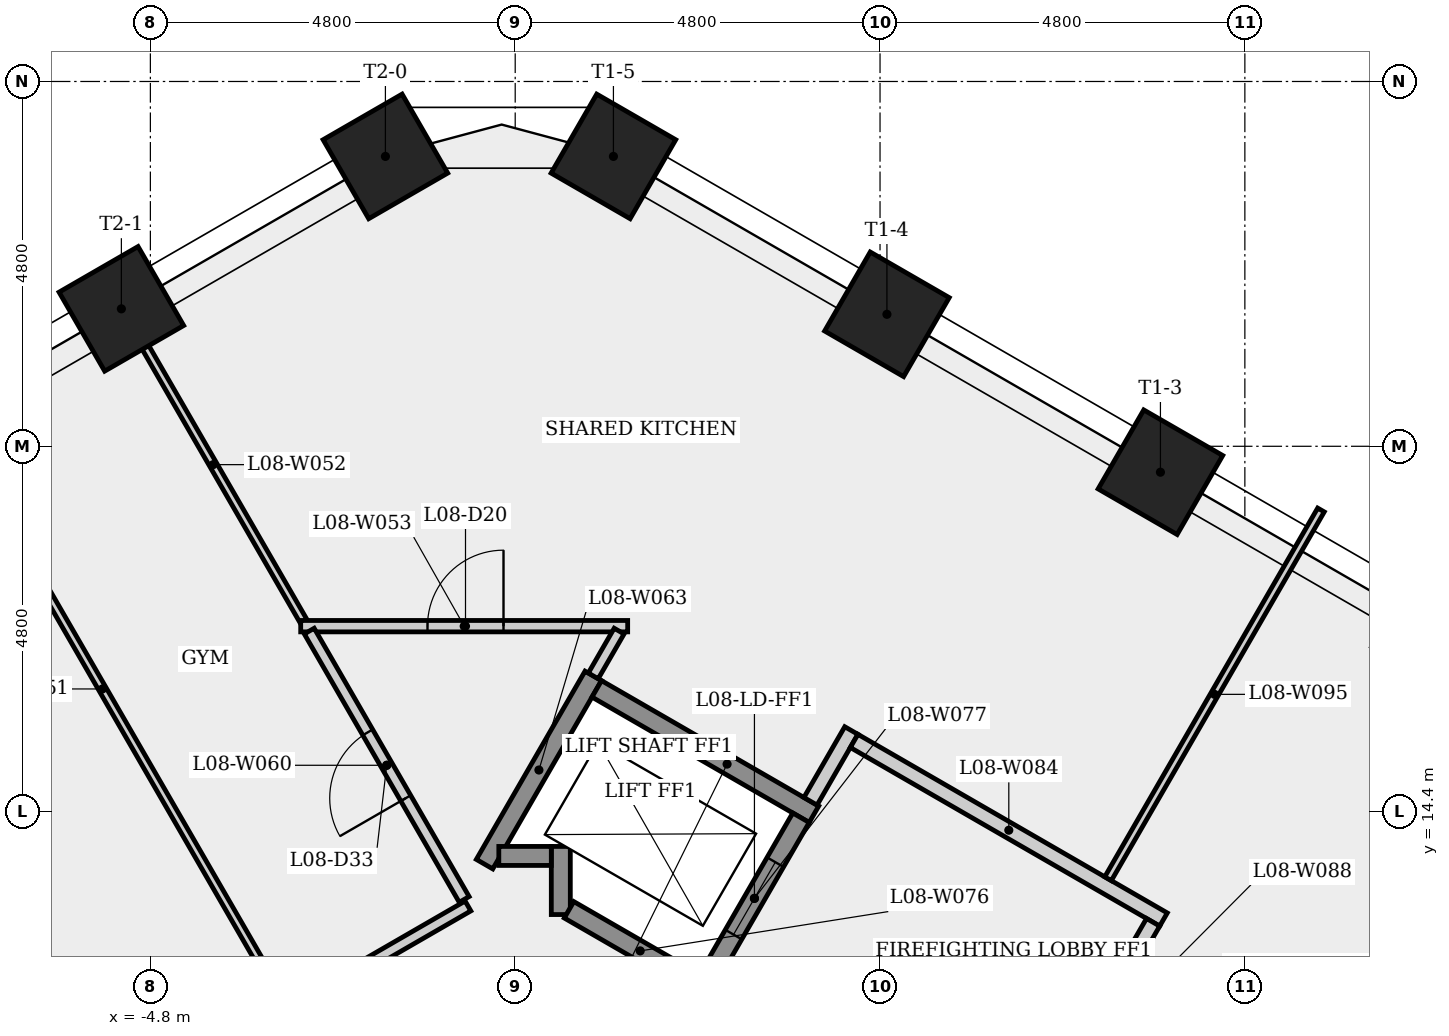
"""IFC4 building model, lengths in metres.
Left out: names, types, materials, properties, quantities, classifications, styles, units other than length and angle.
Written with IfcOpenShell. Run it as: python <this file> out.ifc"""

import sys

from ifc_helpers import new_model, si_unit, direction, frame, frame_2d, origin, origin_2d, place, context, subcontext, project, spatial, rectangle, extrude, element, fill, save


model = new_model("IFC4")
c1 = context("Model", 3, precision=1e-05, world=origin(), true_north=direction((0.0, 1.0)))
c2 = subcontext(c1, "Body", "Model", "MODEL_VIEW")
j1 = project(units=[si_unit("LENGTHUNIT", "METRE"), si_unit("PLANEANGLEUNIT", "RADIAN")], contexts=[c1])
p1 = place(None, origin())
s1 = spatial("IfcSite", under=j1, at=p1, CompositionType="ELEMENT")
p2 = place(p1, origin())
s2 = spatial("IfcBuilding", under=s1, at=p2, CompositionType="ELEMENT")
p3 = place(p2, frame((0.0, 0.0, 35.7)))
s3 = spatial("IfcBuildingStorey", under=s2, at=p3, CompositionType="ELEMENT", Elevation=35.7)
for number, where, z_axis, x_axis in (
    (1, (8.489, 18.859, 0.0), (0.0, 0.0, 1.0), (0.5, 0.866, 0.0)),
    (2, (4.891, 20.937, 0.0), (0.0, 0.0, 1.0), (0.5, 0.866, 0.0)),
    (3, (1.292, 23.014, 0.0), (0.0, 0.0, 1.0), (0.5, 0.866, 0.0)),
    (4, (-1.708, 23.014, 0.0), (0.0, 0.0, 1.0), (-0.5, 0.866, 0.0)),
    (5, (-5.182, 21.009, 0.0), (0.0, 0.0, 1.0), (-0.5, 0.866, 0.0)),
):
    element("IfcColumn", number, at=place(p3, frame(where, z_axis=z_axis, x_axis=x_axis)), inside=s3, PredefinedType="COLUMN", context=c2, shape_type="SweptSolid", body=[
        extrude(rectangle(XDim=1.2, YDim=1.2, at=origin_2d()), origin(), (0.0, 0.0, 1.0), 3.4),
    ])
p4 = place(p3, frame((-10.826, 7.26, 0.0), z_axis=(0.0, 0.0, 1.0), x_axis=(0.866022388473, 0.500005222637, 0.0)))
e6 = element("IfcWall", 6, at=p4, inside=s3, PredefinedType="PARTITIONING", context=c2, shape_type="SweptSolid", body=[
    extrude(rectangle(XDim=11.783, YDim=0.15, at=frame_2d((5.892, 0.0))), origin(), (0.0, 0.0, 1.0), 3.05),
])
p5 = place(p4, frame((5.89, 0.0, 0.0)))
e7 = element("IfcOpeningElement", 7, at=p5, cuts=e6, PredefinedType="OPENING", context=c2, shape_type="SweptSolid", body=[
    extrude(rectangle(XDim=1.0, YDim=2.1, at=frame_2d((0.5, 1.05))), frame((0.0, 0.085, 0.0), z_axis=(0.0, -1.0, 0.0), x_axis=(1.0, 0.0, 0.0)), (0.0, 0.0, 1.0), 0.17),
])
p6 = place(p3, frame((-3.029, 11.848, 0.0), z_axis=(0.0, 0.0, 1.0), x_axis=(-0.49998793222, 0.866032371008, 0.0)))
e8 = element("IfcWall", 8, at=p6, inside=s3, PredefinedType="PARTITIONING", context=c2, shape_type="SweptSolid", body=[
    extrude(rectangle(XDim=9.606, YDim=0.1, at=frame_2d((4.803, 0.0))), origin(), (0.0, 0.0, 1.0), 3.05),
])
p7 = place(p3, frame((-2.785, 16.898, 0.0), z_axis=(0.0, 0.0, 1.0), x_axis=(-0.500018554574, 0.866014691031, 0.0)))
e9 = element("IfcWall", 9, at=p7, inside=s3, PredefinedType="PARTITIONING", context=c2, shape_type="SweptSolid", body=[
    extrude(rectangle(XDim=4.758, YDim=0.1, at=frame_2d((2.379, 0.0))), origin(), (0.0, 0.0, 1.0), 3.05),
])
p8 = place(p3, frame((-2.822, 16.833, 0.0), z_axis=(0.0, 0.0, 1.0), x_axis=(1.0, 0.0, 0.0)))
e10 = element("IfcWall", 10, at=p8, inside=s3, PredefinedType="PARTITIONING", context=c2, shape_type="SweptSolid", body=[
    extrude(rectangle(XDim=4.302, YDim=0.15, at=frame_2d((2.151, 0.0))), origin(), (0.0, 0.0, 1.0), 3.05),
])
p9 = place(p8, frame((1.668, 0.0, 0.0)))
e11 = element("IfcOpeningElement", 11, at=p9, cuts=e10, PredefinedType="OPENING", context=c2, shape_type="SweptSolid", body=[
    extrude(rectangle(XDim=1.0, YDim=2.1, at=frame_2d((0.5, 1.05))), frame((0.0, 0.085, 0.0), z_axis=(0.0, -1.0, 0.0), x_axis=(1.0, 0.0, 0.0)), (0.0, 0.0, 1.0), 0.17),
])
p10 = place(p3, frame((-0.671, 13.237, 0.0), z_axis=(0.0, 0.0, 1.0), x_axis=(-0.499990257196, 0.866031028722, 0.0)))
e12 = element("IfcWall", 12, at=p10, inside=s3, PredefinedType="PARTITIONING", context=c2, shape_type="SweptSolid", body=[
    extrude(rectangle(XDim=4.077, YDim=0.15, at=frame_2d((2.039, 0.0))), origin(), (0.0, 0.0, 1.0), 3.05),
])
p11 = place(p10, frame((1.539, 0.0, 0.0)))
e13 = element("IfcOpeningElement", 13, at=p11, cuts=e12, PredefinedType="OPENING", context=c2, shape_type="SweptSolid", body=[
    extrude(rectangle(XDim=1.0, YDim=2.1, at=frame_2d((0.5, 1.05))), frame((0.0, 0.085, 0.0), z_axis=(0.0, -1.0, 0.0), x_axis=(1.0, 0.0, 0.0)), (0.0, 0.0, 1.0), 0.17),
])
p12 = place(p3, frame((-0.403, 13.702, 0.0), z_axis=(0.0, 0.0, 1.0), x_axis=(0.499976111731, 0.866039195244, 0.0)))
e14 = element("IfcWall", 14, at=p12, inside=s3, PredefinedType="SHEAR", context=c2, shape_type="SweptSolid", body=[
    extrude(rectangle(XDim=2.861, YDim=0.25, at=frame_2d((1.43, 0.0))), origin(), (0.0, 0.0, 1.0), 3.05),
])
p13 = place(p3, frame((0.6, 13.039, 0.0), z_axis=(0.0, 0.0, 1.0), x_axis=(0.0, 1.0, 0.0)))
e15 = element("IfcWall", 15, at=p13, inside=s3, PredefinedType="SHEAR", context=c2, shape_type="SweptSolid", body=[
    extrude(rectangle(XDim=0.896, YDim=0.25, at=frame_2d((0.448, 0.0))), origin(), (0.0, 0.0, 1.0), 3.05),
])
p14 = place(p3, frame((0.475, 13.81, 0.0), z_axis=(0.0, 0.0, 1.0), x_axis=(-1.0, 0.0, 0.0)))
e16 = element("IfcWall", 16, at=p14, inside=s3, PredefinedType="SHEAR", context=c2, shape_type="SweptSolid", body=[
    extrude(rectangle(XDim=0.691, YDim=0.25, at=frame_2d((0.345, 0.0))), origin(), (0.0, 0.0, 1.0), 3.4),
])
p15 = place(p3, frame((1.073, 16.008, 0.0), z_axis=(0.0, 0.0, 1.0), x_axis=(0.866040211805, -0.499974350878, 0.0)))
e17 = element("IfcWall", 17, at=p15, inside=s3, PredefinedType="SHEAR", context=c2, shape_type="SweptSolid", body=[
    extrude(rectangle(XDim=3.3, YDim=0.25, at=frame_2d((1.65, 0.0))), origin(), (0.0, 0.0, 1.0), 3.05),
])
p16 = place(p3, frame((1.367, 16.768, 0.0), z_axis=(0.0, 0.0, 1.0), x_axis=(-0.499805281321, -0.866137795483, 0.0)))
e18 = element("IfcWall", 18, at=p16, inside=s3, PredefinedType="PARTITIONING", context=c2, shape_type="SweptSolid", body=[
    extrude(rectangle(XDim=0.68, YDim=0.15, at=frame_2d((0.34, 0.0))), origin(), (0.0, 0.0, 1.0), 3.05),
])
p17 = place(p3, frame((2.581, 12.02, 0.0), z_axis=(0.0, 0.0, 1.0), x_axis=(-0.86603892542, 0.499976579108, 0.0)))
e19 = element("IfcWall", 19, at=p17, inside=s3, PredefinedType="SHEAR", context=c2, shape_type="SweptSolid", body=[
    extrude(rectangle(XDim=2.162, YDim=0.25, at=frame_2d((1.081, 0.0))), origin(), (0.0, 0.0, 1.0), 3.05),
])
p18 = place(p3, frame((2.535, 12.191, 0.0), z_axis=(0.0, 0.0, 1.0), x_axis=(0.500061746146, 0.865989751695, 0.0)))
e20 = element("IfcWall", 20, at=p18, inside=s3, PredefinedType="SHEAR", context=c2, shape_type="SweptSolid", body=[
    extrude(rectangle(XDim=2.45, YDim=0.25, at=frame_2d((1.225, 0.0))), origin(), (0.0, 0.0, 1.0), 3.4),
])
p19 = place(p18, frame((0.675, 0.0, 0.0)))
e21 = element("IfcOpeningElement", 21, at=p19, cuts=e20, PredefinedType="OPENING", context=c2, shape_type="SweptSolid", body=[
    extrude(rectangle(XDim=1.1, YDim=2.1, at=frame_2d((0.55, 1.05))), frame((0.0, 0.135, 0.0), z_axis=(0.0, -1.0, 0.0), x_axis=(1.0, 0.0, 0.0)), (0.0, 0.0, 1.0), 0.27),
])
p20 = place(p3, frame((3.885, 14.529, 0.0), z_axis=(0.0, 0.0, 1.0), x_axis=(0.499997628298, 0.866026773083, 0.0)))
e22 = element("IfcWall", 22, at=p20, inside=s3, PredefinedType="PARTITIONING", context=c2, shape_type="SweptSolid", body=[
    extrude(rectangle(XDim=1.075, YDim=0.2, at=frame_2d((0.538, 0.0))), origin(), (0.0, 0.0, 1.0), 3.05),
])
p21 = place(p3, frame((4.459, 15.323, 0.0), z_axis=(0.0, 0.0, 1.0), x_axis=(0.866016039709, -0.500016218704, 0.0)))
e23 = element("IfcWall", 23, at=p21, inside=s3, PredefinedType="PARTITIONING", context=c2, shape_type="SweptSolid", body=[
    extrude(rectangle(XDim=4.7, YDim=0.2, at=frame_2d((2.35, 0.0))), origin(), (0.0, 0.0, 1.0), 3.05),
])
p22 = place(p3, frame((6.48, 9.624, 0.0), z_axis=(0.0, 0.0, 1.0), x_axis=(0.500017246033, 0.866015446554, 0.0)))
e24 = element("IfcWall", 24, at=p22, inside=s3, PredefinedType="SHEAR", context=c2, shape_type="SweptSolid", body=[
    extrude(rectangle(XDim=3.25, YDim=0.25, at=frame_2d((1.625, 0.0))), origin(), (0.0, 0.0, 1.0), 3.05),
])
p23 = place(p22, frame((1.125, 0.0, 0.0)))
e25 = element("IfcOpeningElement", 25, at=p23, cuts=e24, PredefinedType="OPENING", context=c2, shape_type="SweptSolid", body=[
    extrude(rectangle(XDim=1.0, YDim=2.1, at=frame_2d((0.5, 1.05))), frame((0.0, 0.135, 0.0), z_axis=(0.0, -1.0, 0.0), x_axis=(1.0, 0.0, 0.0)), (0.0, 0.0, 1.0), 0.27),
])
p24 = place(p3, frame((7.8, 13.51, 0.0), z_axis=(0.0, 0.0, 1.0), x_axis=(0.499991527163, 0.866030295524, 0.0)))
e26 = element("IfcWall", 26, at=p24, inside=s3, PredefinedType="PARTITIONING", context=c2, shape_type="SweptSolid", body=[
    extrude(rectangle(XDim=5.603, YDim=0.1, at=frame_2d((2.801, 0.0))), origin(), (0.0, 0.0, 1.0), 3.05),
])
p25 = place(p3, frame((8.393, 12.937, 0.0), z_axis=(0.0, 0.0, 1.0), x_axis=(-0.500065409566, -0.86598763626, 0.0)))
e27 = element("IfcWall", 27, at=p25, inside=s3, PredefinedType="PARTITIONING", context=c2, shape_type="SweptSolid", body=[
    extrude(rectangle(XDim=0.575, YDim=0.2, at=frame_2d((0.288, 0.0))), origin(), (0.0, 0.0, 1.0), 3.05),
])
p26 = place(p19, origin())
e28 = element("IfcDoor", 28, at=p26, inside=s3, OperationType="SLIDING_TO_LEFT", PredefinedType="DOOR", context=c2, shape_type="SweptSolid", body=[
    extrude(rectangle(XDim=1.1, YDim=2.1, at=frame_2d((0.55, 1.05))), frame((0.0, 0.025, 0.0), z_axis=(0.0, -1.0, 0.0), x_axis=(1.0, 0.0, 0.0)), (0.0, 0.0, 1.0), 0.05),
])
fill(e21, e28)
p27 = place(p9, origin())
e29 = element("IfcDoor", 29, at=p27, inside=s3, OperationType="SINGLE_SWING_RIGHT", PredefinedType="DOOR", context=c2, shape_type="SweptSolid", body=[
    extrude(rectangle(XDim=1.0, YDim=2.1, at=frame_2d((0.5, 1.05))), frame((0.0, 0.025, 0.0), z_axis=(0.0, -1.0, 0.0), x_axis=(1.0, 0.0, 0.0)), (0.0, 0.0, 1.0), 0.05),
])
fill(e11, e29)
p28 = place(p11, origin())
e30 = element("IfcDoor", 30, at=p28, inside=s3, OperationType="SINGLE_SWING_LEFT", PredefinedType="DOOR", context=c2, shape_type="SweptSolid", body=[
    extrude(rectangle(XDim=1.0, YDim=2.1, at=frame_2d((0.5, 1.05))), frame((0.0, 0.025, 0.0), z_axis=(0.0, -1.0, 0.0), x_axis=(1.0, 0.0, 0.0)), (0.0, 0.0, 1.0), 0.05),
])
fill(e13, e30)
save(model, sys.argv[1])
